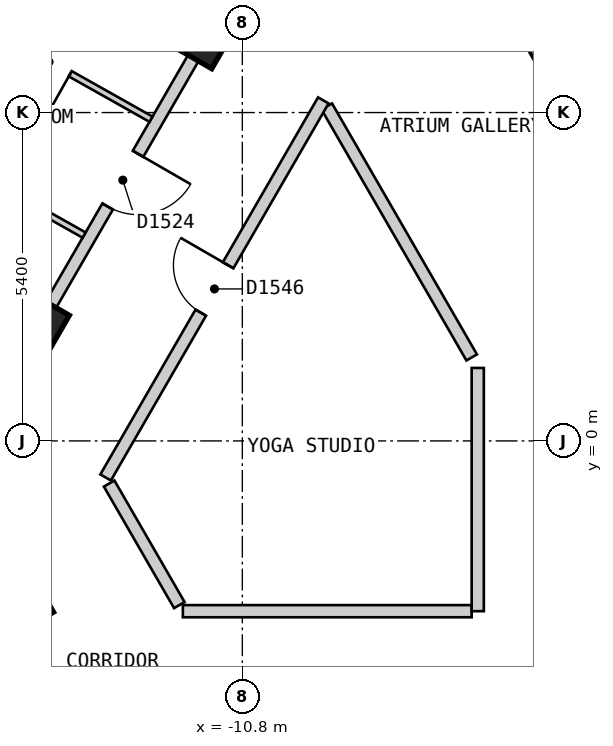
"""IFC4 building model, lengths in metres.
Left out: names, types, materials, properties, quantities, classifications, styles, units other than length and angle.
Written with IfcOpenShell. Run it as: python <this file> out.ifc"""

import sys

from ifc_helpers import new_model, si_unit, direction, frame, frame_2d, origin, origin_2d, place, context, subcontext, project, spatial, rectangle, extrude, element, fill, save


model = new_model("IFC4")
c1 = context("Model", 3, precision=1e-05, world=origin(), true_north=direction((0.0, 1.0)))
c2 = subcontext(c1, "Body", "Model", "MODEL_VIEW")
j1 = project(units=[si_unit("LENGTHUNIT", "METRE"), si_unit("PLANEANGLEUNIT", "RADIAN")], contexts=[c1])
p1 = place(None, origin())
s1 = spatial("IfcSite", under=j1, at=p1, CompositionType="ELEMENT")
p2 = place(p1, origin())
s2 = spatial("IfcBuilding", under=s1, at=p2, CompositionType="ELEMENT")
p3 = place(p2, frame((0.0, 0.0, 190.2)))
s3 = spatial("IfcBuildingStorey", under=s2, at=p3, CompositionType="ELEMENT", Elevation=190.2)
for number, where, z_axis, x_axis in (
    (1, (-14.383, -2.687, 0.0), (0.0, 0.0, 1.0), (0.5, -0.866, 0.0)),
    (2, (-11.431, 6.6, 0.0), (0.0, 0.0, 1.0), (-0.5, -0.866, 0.0)),
    (3, (-14.123, 1.937, 0.0), (0.0, 0.0, 1.0), (-0.5, -0.866, 0.0)),
):
    element("IfcColumn", number, at=place(p3, frame(where, z_axis=z_axis, x_axis=x_axis)), inside=s3, PredefinedType="COLUMN", context=c2, shape_type="SweptSolid", body=[
        extrude(rectangle(XDim=0.7, YDim=0.7, at=origin_2d()), origin(), (0.0, 0.0, 1.0), 3.0),
    ])
p4 = place(p3, frame((-9.411, 5.5, 0.0), z_axis=(0.0, 0.0, 1.0), x_axis=(0.500018099276, -0.86601495391, 0.0)))
e4 = element("IfcWall", 4, at=p4, inside=s3, PredefinedType="PARTITIONING", context=c2, shape_type="SweptSolid", body=[
    extrude(rectangle(XDim=4.765, YDim=0.2, at=frame_2d((2.383, 0.0))), origin(), (0.0, 0.0, 1.0), 2.7),
])
p5 = place(p3, frame((-12.99, -0.701, 0.0), z_axis=(0.0, 0.0, 1.0), x_axis=(0.499972710878, -0.866041158593, 0.0)))
e5 = element("IfcWall", 5, at=p5, inside=s3, PredefinedType="PARTITIONING", context=c2, shape_type="SweptSolid", body=[
    extrude(rectangle(XDim=2.308, YDim=0.2, at=frame_2d((1.154, 0.0))), origin(), (0.0, 0.0, 1.0), 2.7),
])
p6 = place(p3, frame((-11.778, -2.8, 0.0), z_axis=(0.0, 0.0, 1.0), x_axis=(1.0, 0.0, 0.0)))
e6 = element("IfcWall", 6, at=p6, inside=s3, PredefinedType="PARTITIONING", context=c2, shape_type="SweptSolid", body=[
    extrude(rectangle(XDim=4.75, YDim=0.2, at=frame_2d((2.375, 0.0))), origin(), (0.0, 0.0, 1.0), 2.7),
])
p7 = place(p3, frame((-13.048, -0.601, 0.0), z_axis=(0.0, 0.0, 1.0), x_axis=(0.499982180423, 0.866035691677, 0.0)))
e7 = element("IfcWall", 7, at=p7, inside=s3, PredefinedType="PARTITIONING", context=c2, shape_type="SweptSolid", body=[
    extrude(rectangle(XDim=7.16, YDim=0.2, at=frame_2d((3.58, 0.0))), origin(), (0.0, 0.0, 1.0), 2.7),
])
p8 = place(p7, frame((3.13, 0.0, 0.0)))
e8 = element("IfcOpeningElement", 8, at=p8, cuts=e7, PredefinedType="OPENING", context=c2, shape_type="SweptSolid", body=[
    extrude(rectangle(XDim=0.9, YDim=2.1, at=frame_2d((0.45, 1.05))), frame((0.0, 0.11, 0.0), z_axis=(0.0, -1.0, 0.0), x_axis=(1.0, 0.0, 0.0)), (0.0, 0.0, 1.0), 0.22),
])
p9 = place(p3, frame((-15.559, -0.551, 0.0), z_axis=(0.0, 0.0, 1.0), x_axis=(0.499964997208, 0.866045611713, 0.0)))
e9 = element("IfcWall", 9, at=p9, inside=s3, PredefinedType="PARTITIONING", context=c2, shape_type="SweptSolid", body=[
    extrude(rectangle(XDim=9.643, YDim=0.2, at=frame_2d((4.821, 0.0))), origin(), (0.0, 0.0, 1.0), 2.7),
])
p10 = place(p9, frame((5.088, 0.0, 0.0)))
e10 = element("IfcOpeningElement", 10, at=p10, cuts=e9, PredefinedType="OPENING", context=c2, shape_type="SweptSolid", body=[
    extrude(rectangle(XDim=1.0, YDim=2.1, at=frame_2d((0.5, 1.05))), frame((0.0, 0.11, 0.0), z_axis=(0.0, -1.0, 0.0), x_axis=(1.0, 0.0, 0.0)), (0.0, 0.0, 1.0), 0.22),
])
p11 = place(p3, frame((-6.928, -2.8, 0.0), z_axis=(0.0, 0.0, 1.0), x_axis=(0.0, 1.0, 0.0)))
e11 = element("IfcWall", 11, at=p11, inside=s3, PredefinedType="PARTITIONING", context=c2, shape_type="SweptSolid", body=[
    extrude(rectangle(XDim=4.0, YDim=0.2, at=frame_2d((2.0, 0.0))), origin(), (0.0, 0.0, 1.0), 2.7),
])
p12 = place(p3, frame((-16.799, 5.296, 0.0), z_axis=(0.0, 0.0, 1.0), x_axis=(0.871565499758, -0.490279083413, 0.0)))
e12 = element("IfcWall", 12, at=p12, inside=s3, PredefinedType="PARTITIONING", context=c2, shape_type="SweptSolid", body=[
    extrude(rectangle(XDim=3.897, YDim=0.1, at=frame_2d((1.949, 0.0))), origin(), (0.0, 0.0, 1.0), 2.7),
])
p13 = place(p12, frame((1.524, 0.0, 0.0)))
e13 = element("IfcOpeningElement", 13, at=p13, cuts=e12, PredefinedType="OPENING", context=c2, shape_type="SweptSolid", body=[
    extrude(rectangle(XDim=0.9, YDim=2.1, at=frame_2d((0.45, 1.05))), frame((0.0, 0.06, 0.0), z_axis=(0.0, -1.0, 0.0), x_axis=(1.0, 0.0, 0.0)), (0.0, 0.0, 1.0), 0.12),
])
p14 = place(p3, frame((-15.699, 7.202, 0.0), z_axis=(0.0, 0.0, 1.0), x_axis=(0.871565499758, -0.490279083413, 0.0)))
e14 = element("IfcWall", 14, at=p14, inside=s3, PredefinedType="PARTITIONING", context=c2, shape_type="SweptSolid", body=[
    extrude(rectangle(XDim=3.897, YDim=0.1, at=frame_2d((1.949, 0.0))), origin(), (0.0, 0.0, 1.0), 2.7),
])
p15 = place(p14, frame((1.574, 0.0, 0.0)))
e15 = element("IfcOpeningElement", 15, at=p15, cuts=e14, PredefinedType="OPENING", context=c2, shape_type="SweptSolid", body=[
    extrude(rectangle(XDim=0.8, YDim=2.1, at=frame_2d((0.4, 1.05))), frame((0.0, 0.06, 0.0), z_axis=(0.0, -1.0, 0.0), x_axis=(1.0, 0.0, 0.0)), (0.0, 0.0, 1.0), 0.12),
])
p16 = place(p10, origin())
e16 = element("IfcDoor", 16, at=p16, inside=s3, OperationType="SINGLE_SWING_RIGHT", PredefinedType="DOOR", context=c2, shape_type="SweptSolid", body=[
    extrude(rectangle(XDim=1.0, YDim=2.1, at=frame_2d((0.5, 1.05))), frame((0.0, 0.025, 0.0), z_axis=(0.0, -1.0, 0.0), x_axis=(1.0, 0.0, 0.0)), (0.0, 0.0, 1.0), 0.05),
])
fill(e10, e16)
p17 = place(p15, origin())
e17 = element("IfcDoor", 17, at=p17, inside=s3, OperationType="SINGLE_SWING_RIGHT", PredefinedType="DOOR", context=c2, shape_type="SweptSolid", body=[
    extrude(rectangle(XDim=0.8, YDim=2.1, at=frame_2d((0.4, 1.05))), frame((0.0, 0.025, 0.0), z_axis=(0.0, -1.0, 0.0), x_axis=(1.0, 0.0, 0.0)), (0.0, 0.0, 1.0), 0.05),
])
fill(e15, e17)
p18 = place(p8, origin())
e18 = element("IfcDoor", 18, at=p18, inside=s3, OperationType="SINGLE_SWING_RIGHT", PredefinedType="DOOR", context=c2, shape_type="SweptSolid", body=[
    extrude(rectangle(XDim=0.9, YDim=2.1, at=frame_2d((0.45, 1.05))), frame((0.0, 0.025, 0.0), z_axis=(0.0, -1.0, 0.0), x_axis=(1.0, 0.0, 0.0)), (0.0, 0.0, 1.0), 0.05),
])
fill(e8, e18)
save(model, sys.argv[1])
